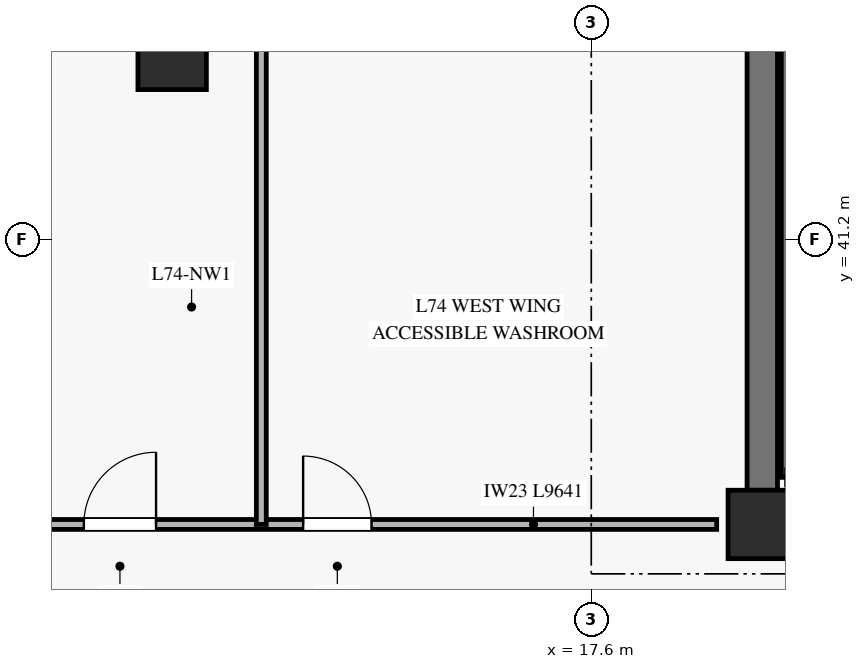
"""IFC4 building model, lengths in metres.
Left out: names, types, materials, properties, quantities, classifications, styles, units other than length and angle.
Written with IfcOpenShell. Run it as: python <this file> out.ifc"""

import sys

from ifc_helpers import new_model, si_unit, direction, frame, frame_2d, origin, origin_2d, place, context, subcontext, project, spatial, rectangle, hollow_rectangle, extrude, source, transform, mapped, element, fill, save


model = new_model("IFC4")
c1 = context("Model", 3, precision=1e-05, world=origin(), true_north=direction((0.0, 1.0)))
c2 = subcontext(c1, "Body", "Model", "MODEL_VIEW")
j1 = project(units=[si_unit("LENGTHUNIT", "METRE"), si_unit("PLANEANGLEUNIT", "RADIAN")], contexts=[c1])
p1 = place(None, origin())
s1 = spatial("IfcSite", under=j1, at=p1, CompositionType="ELEMENT")
p2 = place(p1, origin())
s2 = spatial("IfcBuilding", under=s1, at=p2, CompositionType="ELEMENT")
p3 = place(p2, frame((0.0, 0.0, 290.4)))
s3 = spatial("IfcBuildingStorey", under=s2, at=p3, CompositionType="ELEMENT", Elevation=290.4)
m1 = source(origin(), c2, "Body", "SweptSolid", [
    extrude(rectangle(XDim=0.9, YDim=0.9, at=origin_2d()), origin(), (0.0, 0.0, 1.0), 3.185),
])
p4 = place(p3, frame((19.85, 37.45, 0.0), z_axis=(0.0, 0.0, 1.0), x_axis=(1.0, 0.0, 0.0)))
e1 = element("IfcColumn", 1, at=p4, inside=s3, PredefinedType="PILASTER", context=c2, shape_type="MappedRepresentation", body=[
    mapped(m1, transform((0.0, 0.0, 0.0), x_axis=(1.0, 0.0, 0.0), y_axis=(0.0, 1.0, 0.0), z_axis=(0.0, 0.0, 1.0), scale=1.0)),
])
p5 = place(p3, frame((19.85, 37.9, 0.0), z_axis=(0.0, 0.0, 1.0), x_axis=(0.0, 1.0, 0.0)))
e2 = element("IfcWall", 2, at=p5, inside=s3, PredefinedType="SHEAR", context=c2, shape_type="SweptSolid", body=[
    extrude(rectangle(XDim=8.2, YDim=0.4, at=frame_2d((4.1, 0.0))), origin(), (0.0, 0.0, 1.0), 3.185),
])
m2 = source(origin(), c2, "Body", "SweptSolid", [
    extrude(hollow_rectangle(XDim=0.9, YDim=0.9, WallThickness=0.04, at=origin_2d()), origin(), (0.0, 0.0, 1.0), 3.207),
])
p6 = place(p3, frame((12.086, 43.622, 0.0), z_axis=(0.115114664391, 0.014617735161, 0.993244650557), x_axis=(-0.125972537044, 0.99203372922, 0.0)))
e3 = element("IfcColumn", 3, at=p6, inside=s3, PredefinedType="COLUMN", context=c2, shape_type="MappedRepresentation", body=[
    mapped(m2, transform((0.0, 0.0, 0.0), x_axis=(1.0, 0.0, 0.0), y_axis=(0.0, 1.0, 0.0), z_axis=(0.0, 0.0, 1.0), scale=1.0)),
])
p7 = place(p3, frame((12.311, 46.25, 0.0), z_axis=(0.0, 0.0, 1.0), x_axis=(-0.716883404149, -0.697193075737, 0.0)))
e4 = element("IfcWall", 4, at=p7, inside=s3, PredefinedType="SOLIDWALL", context=c2, shape_type="SweptSolid", body=[
    extrude(rectangle(XDim=3.769, YDim=0.3, at=frame_2d((1.885, 0.0))), origin(), (0.0, 0.0, 1.0), 2.815),
])
p8 = place(p7, frame((1.085, 0.0, 0.45)))
e5 = element("IfcOpeningElement", 5, at=p8, cuts=e4, PredefinedType="OPENING", context=c2, shape_type="SweptSolid", body=[
    extrude(rectangle(XDim=1.6, YDim=2.0, at=frame_2d((0.8, 1.0))), frame((0.0, 0.16, 0.0), z_axis=(0.0, -1.0, 0.0), x_axis=(1.0, 0.0, 0.0)), (0.0, 0.0, 1.0), 0.32),
])
p9 = place(p3, frame((20.17, 38.07, 0.0), z_axis=(0.0, 0.0, 1.0), x_axis=(0.0, 1.0, 0.0)))
e6 = element("IfcWall", 6, at=p9, inside=s3, PredefinedType="SOLIDWALL", context=c2, shape_type="SweptSolid", body=[
    extrude(rectangle(XDim=7.25, YDim=0.14, at=frame_2d((3.625, 0.0))), origin(), (0.0, 0.0, 1.0), 3.4),
])
p10 = place(p3, frame((9.609, 37.45, 0.0), z_axis=(0.0, 0.0, 1.0), x_axis=(1.0, 0.0, 0.0)))
e7 = element("IfcWall", 7, at=p10, inside=s3, PredefinedType="PARTITIONING", context=c2, shape_type="SweptSolid", body=[
    extrude(rectangle(XDim=9.641, YDim=0.13, at=frame_2d((4.821, 0.0))), origin(), (0.0, 0.0, 1.0), 2.82),
])
p11 = place(p10, frame((1.315, 0.0, 0.0)))
e8 = element("IfcOpeningElement", 8, at=p11, cuts=e7, PredefinedType="OPENING", context=c2, shape_type="SweptSolid", body=[
    extrude(rectangle(XDim=0.95, YDim=2.1, at=frame_2d((0.475, 1.05))), frame((0.0, 0.075, 0.0), z_axis=(0.0, -1.0, 0.0), x_axis=(1.0, 0.0, 0.0)), (0.0, 0.0, 1.0), 0.15),
])
p12 = place(p10, frame((4.2, 0.0, 0.0)))
e9 = element("IfcOpeningElement", 9, at=p12, cuts=e7, PredefinedType="OPENING", context=c2, shape_type="SweptSolid", body=[
    extrude(rectangle(XDim=0.9, YDim=2.1, at=frame_2d((0.45, 1.05))), frame((0.0, 0.075, 0.0), z_axis=(0.0, -1.0, 0.0), x_axis=(1.0, 0.0, 0.0)), (0.0, 0.0, 1.0), 0.15),
])
p13 = place(p3, frame((13.259, 37.45, 0.0), z_axis=(0.0, 0.0, 1.0), x_axis=(0.0, 1.0, 0.0)))
e10 = element("IfcWall", 10, at=p13, inside=s3, PredefinedType="PARTITIONING", context=c2, shape_type="SweptSolid", body=[
    extrude(rectangle(XDim=8.8, YDim=0.13, at=frame_2d((4.4, 0.0))), origin(), (0.0, 0.0, 1.0), 3.185),
])
m3 = source(origin(), c2, "Body", "SweptSolid", [
    extrude(rectangle(XDim=0.95, YDim=2.1, at=frame_2d((0.475, 1.05))), frame((0.0, 0.025, 0.0), z_axis=(0.0, -1.0, 0.0), x_axis=(1.0, 0.0, 0.0)), (0.0, 0.0, 1.0), 0.05),
])
p14 = place(p11, origin())
e11 = element("IfcDoor", 11, at=p14, inside=s3, OperationType="SINGLE_SWING_RIGHT", PredefinedType="DOOR", context=c2, shape_type="MappedRepresentation", body=[
    mapped(m3, transform((0.0, 0.0, 0.0), x_axis=(1.0, 0.0, 0.0), y_axis=(0.0, 1.0, 0.0), z_axis=(0.0, 0.0, 1.0), scale=1.0)),
])
fill(e8, e11)
m4 = source(origin(), c2, "Body", "SweptSolid", [
    extrude(rectangle(XDim=0.9, YDim=2.1, at=frame_2d((0.45, 1.05))), frame((0.0, 0.025, 0.0), z_axis=(0.0, -1.0, 0.0), x_axis=(1.0, 0.0, 0.0)), (0.0, 0.0, 1.0), 0.05),
])
p15 = place(p12, origin())
e12 = element("IfcDoor", 12, at=p15, inside=s3, OperationType="SINGLE_SWING_LEFT", PredefinedType="DOOR", context=c2, shape_type="MappedRepresentation", body=[
    mapped(m4, transform((0.0, 0.0, 0.0), x_axis=(1.0, 0.0, 0.0), y_axis=(0.0, 1.0, 0.0), z_axis=(0.0, 0.0, 1.0), scale=1.0)),
])
fill(e9, e12)
save(model, sys.argv[1])
